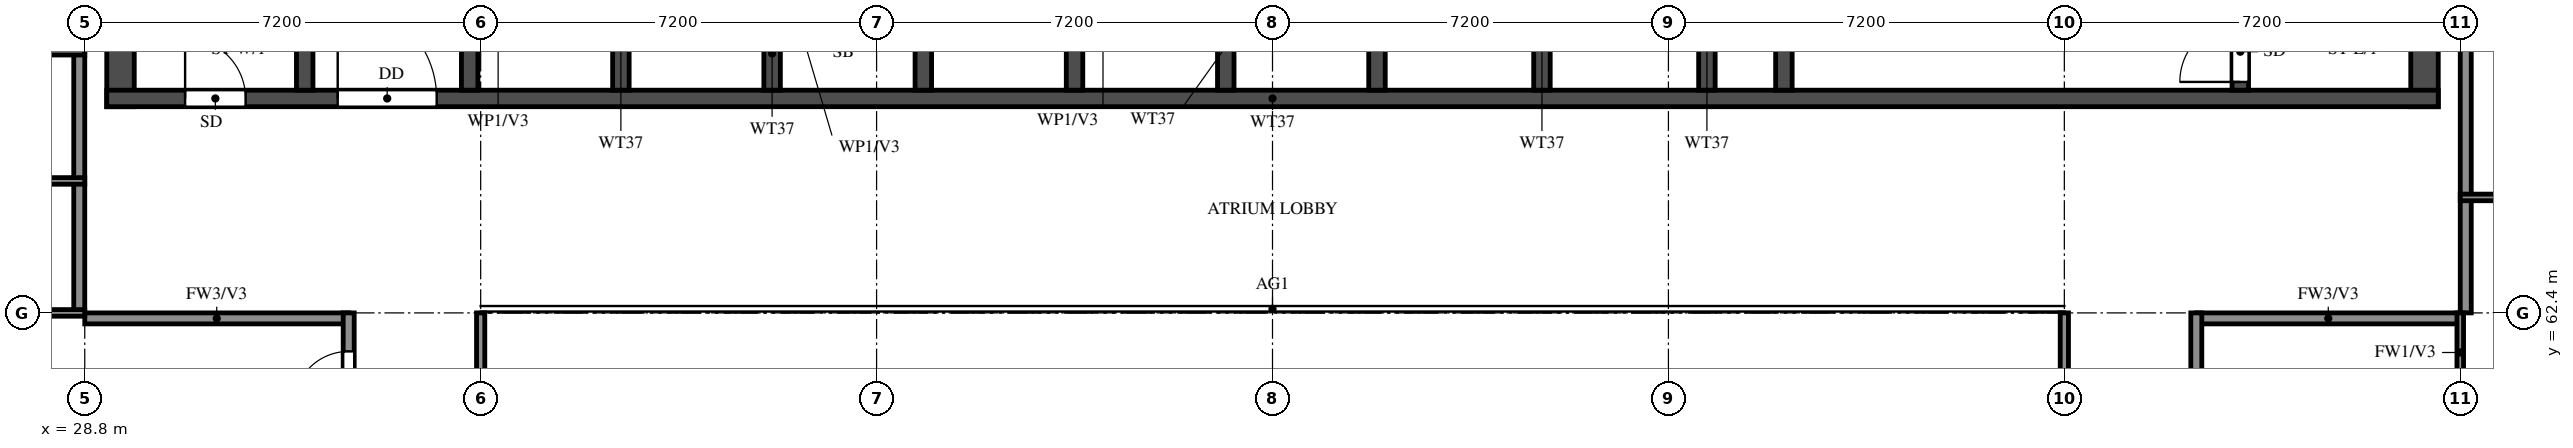
"""IFC4 building model, lengths in metres.
Left out: names, types, materials, properties, quantities, classifications, styles, units other than length and angle.
Written with IfcOpenShell. Run it as: python <this file> out.ifc"""

import sys

from ifc_helpers import new_model, si_unit, direction, frame, frame_2d, origin, place, context, subcontext, project, spatial, rectangle, extrude, element, fill, save


model = new_model("IFC4")
c1 = context("Model", 3, precision=1e-05, world=origin(), true_north=direction((0.0, 1.0)))
c2 = subcontext(c1, "Body", "Model", "MODEL_VIEW")
j1 = project(units=[si_unit("LENGTHUNIT", "METRE"), si_unit("PLANEANGLEUNIT", "RADIAN")], contexts=[c1])
p1 = place(None, origin())
s1 = spatial("IfcSite", under=j1, at=p1, CompositionType="ELEMENT")
p2 = place(p1, origin())
s2 = spatial("IfcBuilding", under=s1, at=p2, CompositionType="ELEMENT")
p3 = place(p2, frame((0.0, 0.0, 250.0)))
s3 = spatial("IfcBuildingStorey", under=s2, at=p3, CompositionType="ELEMENT", Elevation=250.0)
for number, where, z_axis, x_axis in (
    (1, (29.45, 66.15, 0.0), (0.0, 0.0, 1.0), (0.0, 1.0, 0.0)),
    (2, (71.35, 66.15, 0.0), (0.0, 0.0, 1.0), (0.0, 1.0, 0.0)),
):
    element("IfcWall", number, at=place(p3, frame(where, z_axis=z_axis, x_axis=x_axis)), inside=s3, PredefinedType="SHEAR", context=c2, shape_type="SweptSolid", body=[
        extrude(rectangle(XDim=11.85, YDim=0.5, at=frame_2d((5.925, 0.0))), origin(), (0.0, 0.0, 1.0), 3.22),
    ])
p4 = place(p3, frame((29.2, 66.3, 0.0), z_axis=(0.0, 0.0, 1.0), x_axis=(1.0, 0.0, 0.0)))
e3 = element("IfcWall", 3, at=p4, inside=s3, PredefinedType="SHEAR", context=c2, shape_type="SweptSolid", body=[
    extrude(rectangle(XDim=42.4, YDim=0.3, at=frame_2d((21.2, 0.0))), origin(), (0.0, 0.0, 1.0), 3.22),
])
p5 = place(p4, frame((1.425, 0.0, 0.0)))
e4 = element("IfcOpeningElement", 4, at=p5, cuts=e3, PredefinedType="OPENING", context=c2, shape_type="SweptSolid", body=[
    extrude(rectangle(XDim=1.1, YDim=2.1, at=frame_2d((0.55, 1.05))), frame((0.0, 0.16, 0.0), z_axis=(0.0, -1.0, 0.0), x_axis=(1.0, 0.0, 0.0)), (0.0, 0.0, 1.0), 0.32),
])
p6 = place(p4, frame((4.2, 0.0, 0.0)))
e5 = element("IfcOpeningElement", 5, at=p6, cuts=e3, PredefinedType="OPENING", context=c2, shape_type="SweptSolid", body=[
    extrude(rectangle(XDim=1.8, YDim=2.1, at=frame_2d((0.9, 1.05))), frame((0.0, 0.16, 0.0), z_axis=(0.0, -1.0, 0.0), x_axis=(1.0, 0.0, 0.0)), (0.0, 0.0, 1.0), 0.32),
])
p7 = place(p3, frame((32.8, 66.45, 0.0), z_axis=(0.0, 0.0, 1.0), x_axis=(0.0, 1.0, 0.0)))
e6 = element("IfcWall", 6, at=p7, inside=s3, PredefinedType="SHEAR", context=c2, shape_type="SweptSolid", body=[
    extrude(rectangle(XDim=11.05, YDim=0.3, at=frame_2d((5.525, 0.0))), origin(), (0.0, 0.0, 1.0), 3.22),
])
p8 = place(p3, frame((68.0, 66.45, 0.0), z_axis=(0.0, 0.0, 1.0), x_axis=(0.0, 1.0, 0.0)))
e7 = element("IfcWall", 7, at=p8, inside=s3, PredefinedType="SHEAR", context=c2, shape_type="SweptSolid", body=[
    extrude(rectangle(XDim=11.05, YDim=0.3, at=frame_2d((5.525, 0.0))), origin(), (0.0, 0.0, 1.0), 3.22),
])
p9 = place(p8, frame((0.15, 0.0, 0.0)))
e8 = element("IfcOpeningElement", 8, at=p9, cuts=e7, PredefinedType="OPENING", context=c2, shape_type="SweptSolid", body=[
    extrude(rectangle(XDim=1.1, YDim=2.1, at=frame_2d((0.55, 1.05))), frame((0.0, 0.16, 0.0), z_axis=(0.0, -1.0, 0.0), x_axis=(1.0, 0.0, 0.0)), (0.0, 0.0, 1.0), 0.32),
])
p10 = place(p3, frame((59.7, 66.45, 0.0), z_axis=(0.0, 0.0, 1.0), x_axis=(0.0, 1.0, 0.0)))
e9 = element("IfcWall", 9, at=p10, inside=s3, PredefinedType="SHEAR", context=c2, shape_type="SweptSolid", body=[
    extrude(rectangle(XDim=6.175, YDim=0.3, at=frame_2d((3.087, 0.0))), origin(), (0.0, 0.0, 1.0), 3.22),
])
p11 = place(p10, frame((3.85, 0.0, 0.0)))
e10 = element("IfcOpeningElement", 10, at=p11, cuts=e9, PredefinedType="OPENING", context=c2, shape_type="SweptSolid", body=[
    extrude(rectangle(XDim=1.2, YDim=2.1, at=frame_2d((0.6, 1.05))), frame((0.0, 0.16, 0.0), z_axis=(0.0, -1.0, 0.0), x_axis=(1.0, 0.0, 0.0)), (0.0, 0.0, 1.0), 0.32),
])
for number, where, z_axis, x_axis in (
    (11, (35.8, 66.45, 0.0), (0.0, 0.0, 1.0), (0.0, 1.0, 0.0)),
    (12, (38.55, 66.45, 0.0), (0.0, 0.0, 1.0), (0.0, 1.0, 0.0)),
    (13, (41.3, 66.45, 0.0), (0.0, 0.0, 1.0), (0.0, 1.0, 0.0)),
    (14, (44.05, 66.45, 0.0), (0.0, 0.0, 1.0), (0.0, 1.0, 0.0)),
    (15, (46.8, 66.45, 0.0), (0.0, 0.0, 1.0), (0.0, 1.0, 0.0)),
    (16, (49.55, 66.45, 0.0), (0.0, 0.0, 1.0), (0.0, 1.0, 0.0)),
    (17, (52.3, 66.45, 0.0), (0.0, 0.0, 1.0), (0.0, 1.0, 0.0)),
    (18, (55.3, 66.45, 0.0), (0.0, 0.0, 1.0), (0.0, 1.0, 0.0)),
    (19, (58.3, 66.45, 0.0), (0.0, 0.0, 1.0), (0.0, 1.0, 0.0)),
):
    element("IfcWall", number, at=place(p3, frame(where, z_axis=z_axis, x_axis=x_axis)), inside=s3, PredefinedType="SHEAR", context=c2, shape_type="SweptSolid", body=[
        extrude(rectangle(XDim=2.425, YDim=0.3, at=frame_2d((1.212, 0.0))), origin(), (0.0, 0.0, 1.0), 3.22),
    ])
for number, where, z_axis, x_axis in (
    (20, (28.8, 62.3, 0.0), (0.0, 0.0, 1.0), (1.0, 0.0, 0.0)),
    (21, (67.2, 62.3, 0.0), (0.0, 0.0, 1.0), (1.0, 0.0, 0.0)),
):
    element("IfcWall", number, at=place(p3, frame(where, z_axis=z_axis, x_axis=x_axis)), inside=s3, PredefinedType="SOLIDWALL", context=c2, shape_type="SweptSolid", body=[
        extrude(rectangle(XDim=4.8, YDim=0.2, at=frame_2d((2.4, 0.0))), origin(), (0.0, 0.0, 1.0), 3.22),
    ])
p12 = place(p3, frame((28.7, 62.4, 0.0), z_axis=(0.0, 0.0, 1.0), x_axis=(0.0, 1.0, 0.0)))
e22 = element("IfcWall", 22, at=p12, inside=s3, PredefinedType="SOLIDWALL", context=c2, shape_type="SweptSolid", body=[
    extrude(rectangle(XDim=15.6, YDim=0.2, at=frame_2d((7.8, 0.0))), origin(), (0.0, 0.0, 1.0), 3.22),
])
p13 = place(p3, frame((33.6, 45.6, 0.0), z_axis=(0.0, 0.0, 1.0), x_axis=(0.0, 1.0, 0.0)))
e23 = element("IfcWall", 23, at=p13, inside=s3, PredefinedType="SOLIDWALL", context=c2, shape_type="SweptSolid", body=[
    extrude(rectangle(XDim=16.8, YDim=0.2, at=frame_2d((8.4, 0.0))), origin(), (0.0, 0.0, 1.0), 3.22),
])
p14 = place(p13, frame((0.7, 0.0, 0.0)))
e24 = element("IfcOpeningElement", 24, at=p14, cuts=e23, PredefinedType="OPENING", context=c2, shape_type="SweptSolid", body=[
    extrude(rectangle(XDim=1.0, YDim=2.1, at=frame_2d((0.5, 1.05))), frame((0.0, 0.11, 0.0), z_axis=(0.0, -1.0, 0.0), x_axis=(1.0, 0.0, 0.0)), (0.0, 0.0, 1.0), 0.22),
])
p15 = place(p13, frame((8.3, 0.0, 0.0)))
e25 = element("IfcOpeningElement", 25, at=p15, cuts=e23, PredefinedType="OPENING", context=c2, shape_type="SweptSolid", body=[
    extrude(rectangle(XDim=1.0, YDim=2.1, at=frame_2d((0.5, 1.05))), frame((0.0, 0.11, 0.0), z_axis=(0.0, -1.0, 0.0), x_axis=(1.0, 0.0, 0.0)), (0.0, 0.0, 1.0), 0.22),
])
p16 = place(p13, frame((15.1, 0.0, 0.0)))
e26 = element("IfcOpeningElement", 26, at=p16, cuts=e23, PredefinedType="OPENING", context=c2, shape_type="SweptSolid", body=[
    extrude(rectangle(XDim=1.0, YDim=2.1, at=frame_2d((0.5, 1.05))), frame((0.0, 0.11, 0.0), z_axis=(0.0, -1.0, 0.0), x_axis=(1.0, 0.0, 0.0)), (0.0, 0.0, 1.0), 0.22),
])
p17 = place(p3, frame((67.2, 56.4, 0.0), z_axis=(0.0, 0.0, 1.0), x_axis=(0.0, 1.0, 0.0)))
e27 = element("IfcWall", 27, at=p17, inside=s3, PredefinedType="SOLIDWALL", context=c2, shape_type="SweptSolid", body=[
    extrude(rectangle(XDim=6.0, YDim=0.2, at=frame_2d((3.0, 0.0))), origin(), (0.0, 0.0, 1.0), 3.22),
])
p18 = place(p17, frame((3.7, 0.0, 0.0)))
e28 = element("IfcOpeningElement", 28, at=p18, cuts=e27, PredefinedType="OPENING", context=c2, shape_type="SweptSolid", body=[
    extrude(rectangle(XDim=1.0, YDim=2.1, at=frame_2d((0.5, 1.05))), frame((0.0, 0.11, 0.0), z_axis=(0.0, -1.0, 0.0), x_axis=(1.0, 0.0, 0.0)), (0.0, 0.0, 1.0), 0.22),
])
p19 = place(p3, frame((72.1, 62.4, 0.0), z_axis=(0.0, 0.0, 1.0), x_axis=(0.0, 1.0, 0.0)))
e29 = element("IfcWall", 29, at=p19, inside=s3, PredefinedType="SOLIDWALL", context=c2, shape_type="SweptSolid", body=[
    extrude(rectangle(XDim=15.6, YDim=0.2, at=frame_2d((7.8, 0.0))), origin(), (0.0, 0.0, 1.0), 3.22),
])
p20 = place(p3, frame((26.4, 62.4, 0.0), z_axis=(0.0, 0.0, 1.0), x_axis=(1.0, 0.0, 0.0)))
e30 = element("IfcWall", 30, at=p20, inside=s3, PredefinedType="PARTITIONING", context=c2, shape_type="SweptSolid", body=[
    extrude(rectangle(XDim=2.4, YDim=0.12, at=frame_2d((1.2, 0.0))), origin(), (0.0, 0.0, 1.0), 3.22),
])
p21 = place(p20, frame((0.75, 0.0, 0.0)))
e31 = element("IfcOpeningElement", 31, at=p21, cuts=e30, PredefinedType="OPENING", context=c2, shape_type="SweptSolid", body=[
    extrude(rectangle(XDim=0.9, YDim=2.1, at=frame_2d((0.45, 1.05))), frame((0.0, 0.07, 0.0), z_axis=(0.0, -1.0, 0.0), x_axis=(1.0, 0.0, 0.0)), (0.0, 0.0, 1.0), 0.14),
])
p22 = place(p3, frame((72.0, 64.5, 0.0), z_axis=(0.0, 0.0, 1.0), x_axis=(1.0, 0.0, 0.0)))
e32 = element("IfcWall", 32, at=p22, inside=s3, PredefinedType="PARTITIONING", context=c2, shape_type="SweptSolid", body=[
    extrude(rectangle(XDim=3.5, YDim=0.12, at=frame_2d((1.75, 0.0))), origin(), (0.0, 0.0, 1.0), 3.22),
])
p23 = place(p3, frame((25.3, 64.8, 0.0), z_axis=(0.0, 0.0, 1.0), x_axis=(1.0, 0.0, 0.0)))
e33 = element("IfcWall", 33, at=p23, inside=s3, PredefinedType="PARTITIONING", context=c2, shape_type="SweptSolid", body=[
    extrude(rectangle(XDim=3.5, YDim=0.12, at=frame_2d((1.75, 0.0))), origin(), (0.0, 0.0, 1.0), 3.22),
])
p24 = place(p23, frame((1.3, 0.0, 0.0)))
e34 = element("IfcOpeningElement", 34, at=p24, cuts=e33, PredefinedType="OPENING", context=c2, shape_type="SweptSolid", body=[
    extrude(rectangle(XDim=0.9, YDim=2.1, at=frame_2d((0.45, 1.05))), frame((0.0, 0.07, 0.0), z_axis=(0.0, -1.0, 0.0), x_axis=(1.0, 0.0, 0.0)), (0.0, 0.0, 1.0), 0.14),
])
p25 = place(p3, frame((25.3, 67.15, 0.0), z_axis=(0.0, 0.0, 1.0), x_axis=(1.0, 0.0, 0.0)))
e35 = element("IfcWall", 35, at=p25, inside=s3, PredefinedType="PARTITIONING", context=c2, shape_type="SweptSolid", body=[
    extrude(rectangle(XDim=3.5, YDim=0.12, at=frame_2d((1.75, 0.0))), origin(), (0.0, 0.0, 1.0), 3.22),
])
p26 = place(p3, frame((72.0, 58.8, 0.0), z_axis=(0.0, 0.0, 1.0), x_axis=(0.0, 1.0, 0.0)))
e36 = element("IfcWall", 36, at=p26, inside=s3, PredefinedType="PARTITIONING", context=c2, shape_type="SweptSolid", body=[
    extrude(rectangle(XDim=3.6, YDim=0.12, at=frame_2d((1.8, 0.0))), origin(), (0.0, 0.0, 1.0), 3.22),
])
p27 = place(p26, frame((0.75, 0.0, 0.0)))
e37 = element("IfcOpeningElement", 37, at=p27, cuts=e36, PredefinedType="OPENING", context=c2, shape_type="SweptSolid", body=[
    extrude(rectangle(XDim=0.9, YDim=2.1, at=frame_2d((0.45, 1.05))), frame((0.0, 0.07, 0.0), z_axis=(0.0, -1.0, 0.0), x_axis=(1.0, 0.0, 0.0)), (0.0, 0.0, 1.0), 0.14),
])
for number, where, z_axis, x_axis in (
    (38, (36.0, 48.0, 0.0), (0.0, 0.0, 1.0), (0.0, 1.0, 0.0)),
    (39, (64.8, 48.0, 0.0), (0.0, 0.0, 1.0), (0.0, 1.0, 0.0)),
):
    element("IfcWall", number, at=place(p3, frame(where, z_axis=z_axis, x_axis=x_axis)), inside=s3, PredefinedType="SOLIDWALL", context=c2, shape_type="SweptSolid", body=[
        extrude(rectangle(XDim=14.4, YDim=0.15, at=frame_2d((7.2, 0.0))), origin(), (0.0, 0.0, 1.0), 2.32),
    ])
p28 = place(p5, origin())
e40 = element("IfcDoor", 40, at=p28, inside=s3, OperationType="SINGLE_SWING_LEFT", PredefinedType="DOOR", context=c2, shape_type="SweptSolid", body=[
    extrude(rectangle(XDim=1.1, YDim=2.1, at=frame_2d((0.55, 1.05))), frame((0.0, 0.025, 0.0), z_axis=(0.0, -1.0, 0.0), x_axis=(1.0, 0.0, 0.0)), (0.0, 0.0, 1.0), 0.05),
])
fill(e4, e40)
p29 = place(p9, origin())
e41 = element("IfcDoor", 41, at=p29, inside=s3, OperationType="SINGLE_SWING_RIGHT", PredefinedType="DOOR", context=c2, shape_type="SweptSolid", body=[
    extrude(rectangle(XDim=1.1, YDim=2.1, at=frame_2d((0.55, 1.05))), frame((0.0, 0.025, 0.0), z_axis=(0.0, -1.0, 0.0), x_axis=(1.0, 0.0, 0.0)), (0.0, 0.0, 1.0), 0.05),
])
fill(e8, e41)
p30 = place(p6, origin())
e42 = element("IfcDoor", 42, at=p30, inside=s3, OperationType="DOUBLE_DOOR_SINGLE_SWING", PredefinedType="DOOR", context=c2, shape_type="SweptSolid", body=[
    extrude(rectangle(XDim=1.8, YDim=2.1, at=frame_2d((0.9, 1.05))), frame((0.0, 0.025, 0.0), z_axis=(0.0, -1.0, 0.0), x_axis=(1.0, 0.0, 0.0)), (0.0, 0.0, 1.0), 0.05),
])
fill(e5, e42)
p31 = place(p16, origin())
e43 = element("IfcDoor", 43, at=p31, inside=s3, OperationType="SINGLE_SWING_RIGHT", PredefinedType="DOOR", context=c2, shape_type="SweptSolid", body=[
    extrude(rectangle(XDim=1.0, YDim=2.1, at=frame_2d((0.5, 1.05))), frame((0.0, 0.025, 0.0), z_axis=(0.0, -1.0, 0.0), x_axis=(1.0, 0.0, 0.0)), (0.0, 0.0, 1.0), 0.05),
])
fill(e26, e43)
save(model, sys.argv[1])
